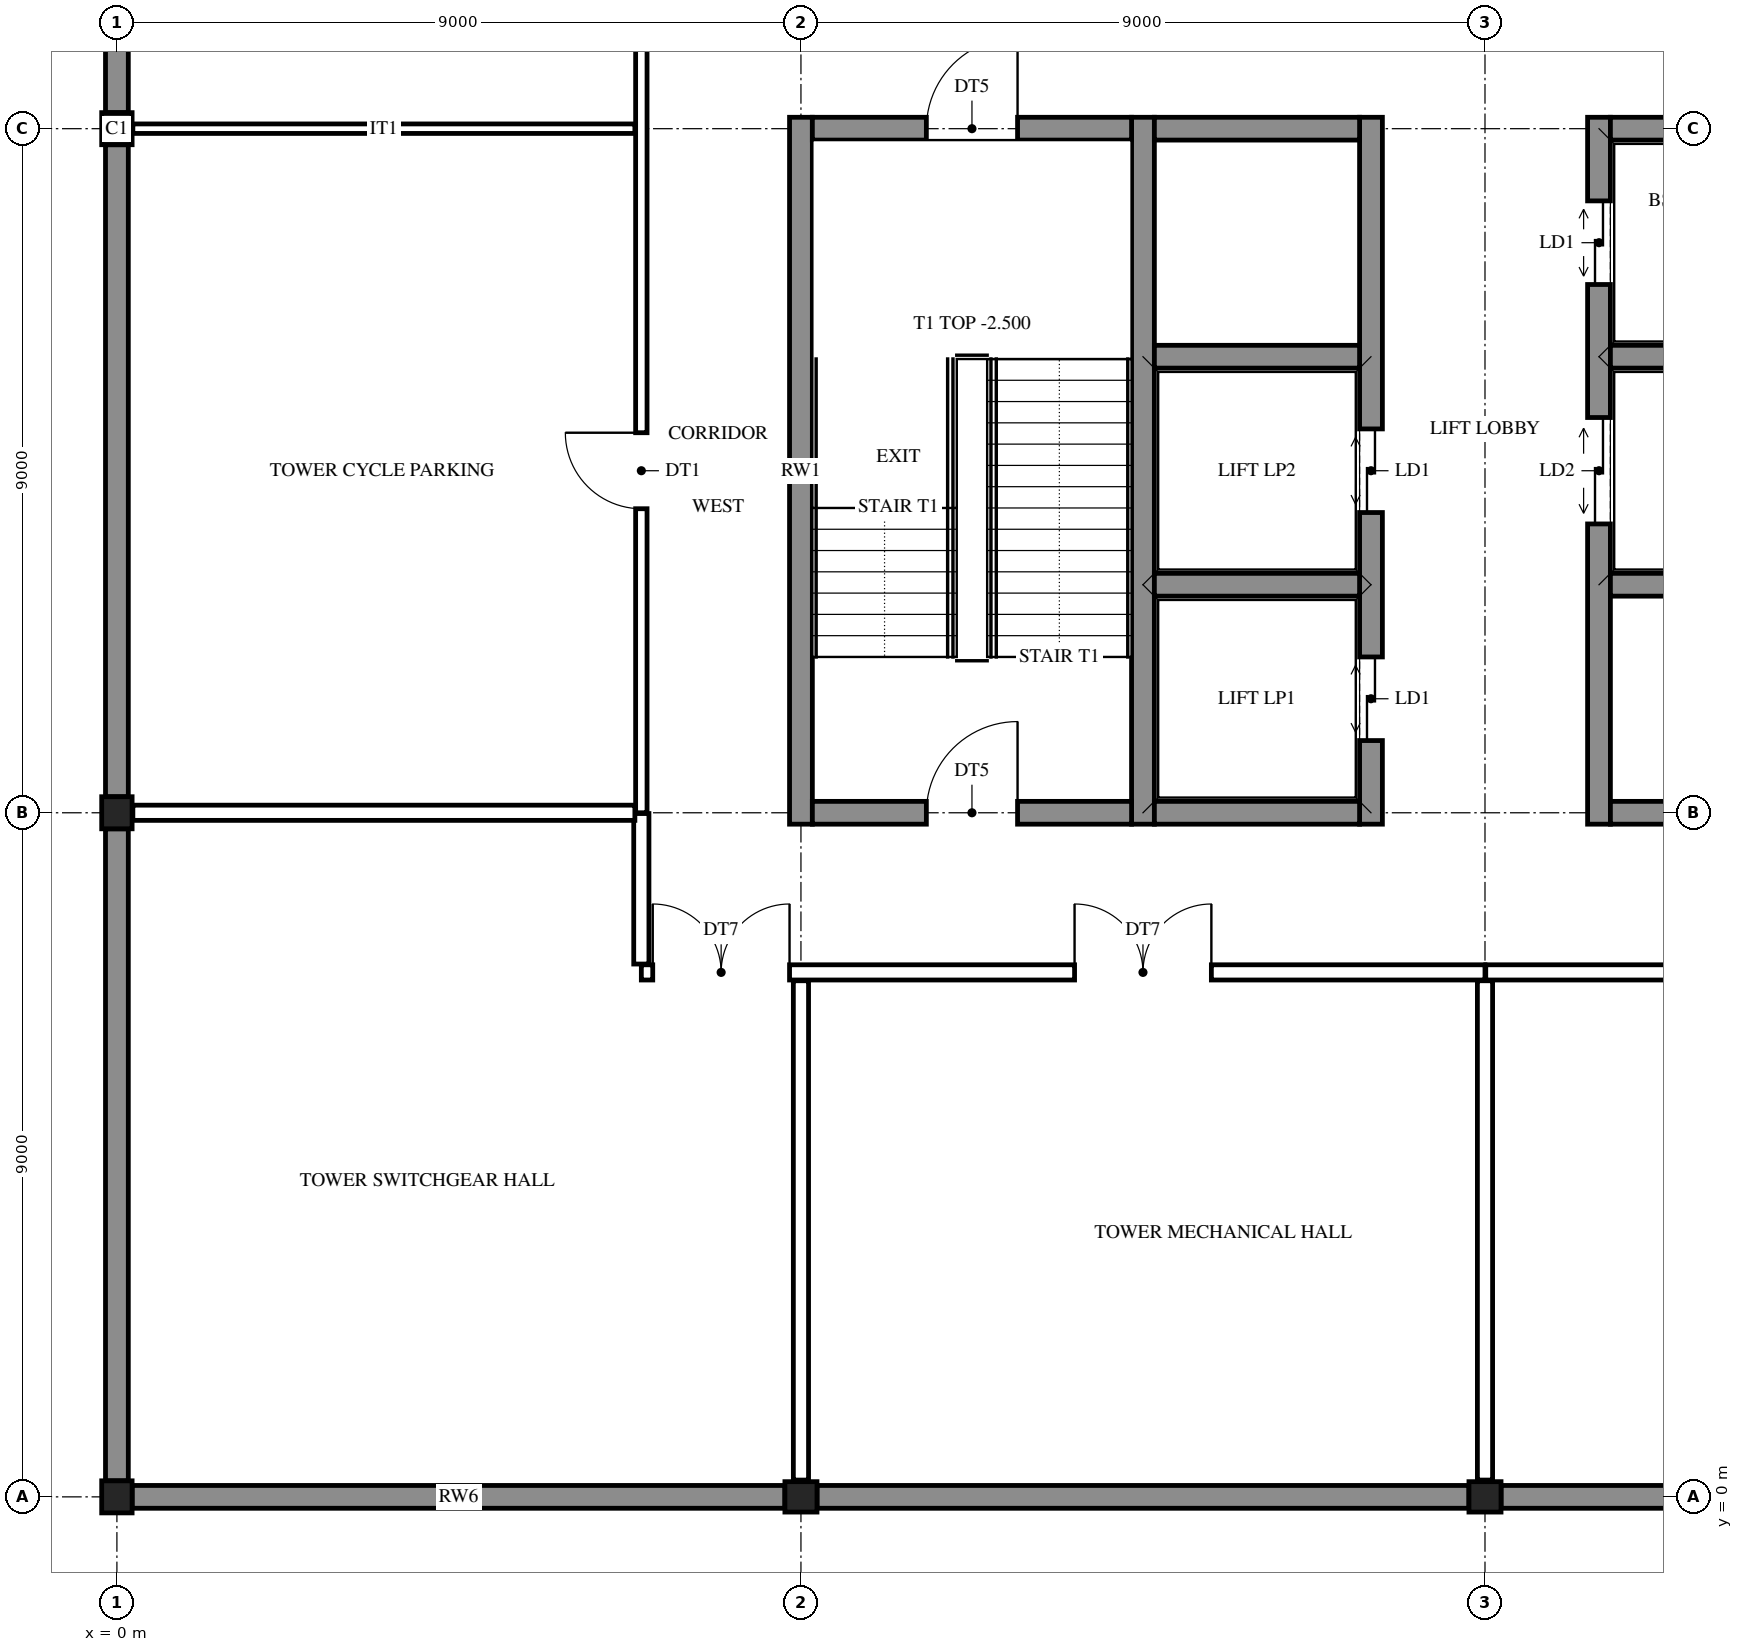
"""IFC4 building model, lengths in metres.
Left out: names, types, materials, properties, quantities, classifications, styles, units other than length and angle.
Written with IfcOpenShell. Run it as: python <this file> out.ifc"""

import sys

from ifc_helpers import new_model, si_unit, direction, frame, frame_2d, origin, origin_2d, place, context, subcontext, project, spatial, rectangle, i_section, extrude, element, fill, save


model = new_model("IFC4")
c1 = context("Model", 3, precision=1e-05, world=origin(), true_north=direction((0.0, 1.0)))
c2 = subcontext(c1, "Body", "Model", "MODEL_VIEW")
j1 = project(units=[si_unit("LENGTHUNIT", "METRE"), si_unit("PLANEANGLEUNIT", "RADIAN")], contexts=[c1])
p1 = place(None, origin())
s1 = spatial("IfcSite", under=j1, at=p1, CompositionType="ELEMENT")
p2 = place(p1, origin())
s2 = spatial("IfcBuilding", under=s1, at=p2, CompositionType="ELEMENT")
p3 = place(p2, frame((0.0, 0.0, -5.0)))
s3 = spatial("IfcBuildingStorey", under=s2, at=p3, CompositionType="ELEMENT", Elevation=-5.0)
for number, where, z_axis, x_axis in (
    (1, (0.0, 0.0, -0.4), (0.0, 0.0, 1.0), (1.0, 0.0, 0.0)),
    (2, (0.0, 9.0, -0.4), (0.0, 0.0, 1.0), (1.0, 0.0, 0.0)),
    (3, (0.0, 18.0, -0.4), (0.0, 0.0, 1.0), (1.0, 0.0, 0.0)),
    (4, (9.0, 0.0, -0.4), (0.0, 0.0, 1.0), (0.0, 1.0, 0.0)),
    (5, (18.0, 0.0, -0.4), (0.0, 0.0, 1.0), (0.0, 1.0, 0.0)),
):
    element("IfcColumn", number, at=place(p3, frame(where, z_axis=z_axis, x_axis=x_axis)), inside=s3, PredefinedType="COLUMN", context=c2, shape_type="SweptSolid", body=[
        extrude(i_section(OverallWidth=0.4, OverallDepth=0.422, WebThickness=0.028, FlangeThickness=0.036, at=origin_2d()), origin(), (0.0, 0.0, 1.0), 5.4),
    ])
for number, where, z_axis, x_axis in (
    (6, (9.0, 8.85, -0.4), (0.0, 0.0, 1.0), (0.0, 1.0, 0.0)),
    (7, (13.5, 8.85, -0.4), (0.0, 0.0, 1.0), (0.0, 1.0, 0.0)),
):
    element("IfcWall", number, at=place(p3, frame(where, z_axis=z_axis, x_axis=x_axis)), inside=s3, PredefinedType="SHEAR", context=c2, shape_type="SweptSolid", body=[
        extrude(rectangle(XDim=9.3, YDim=0.3, at=frame_2d((4.65, 0.0))), origin(), (0.0, 0.0, 1.0), 5.4),
    ])
p4 = place(p3, frame((16.5, 8.85, -0.4), z_axis=(0.0, 0.0, 1.0), x_axis=(0.0, 1.0, 0.0)))
e8 = element("IfcWall", 8, at=p4, inside=s3, PredefinedType="SHEAR", context=c2, shape_type="SweptSolid", body=[
    extrude(rectangle(XDim=9.3, YDim=0.3, at=frame_2d((4.65, 0.0))), origin(), (0.0, 0.0, 1.0), 5.4),
])
p5 = place(p4, frame((1.1, 0.0, 0.4)))
e9 = element("IfcOpeningElement", 9, at=p5, cuts=e8, PredefinedType="OPENING", context=c2, shape_type="SweptSolid", body=[
    extrude(rectangle(XDim=1.1, YDim=2.1, at=frame_2d((0.55, 1.05))), frame((0.0, 0.16, 0.0), z_axis=(0.0, -1.0, 0.0), x_axis=(1.0, 0.0, 0.0)), (0.0, 0.0, 1.0), 0.32),
])
p6 = place(p4, frame((4.1, 0.0, 0.4)))
e10 = element("IfcOpeningElement", 10, at=p6, cuts=e8, PredefinedType="OPENING", context=c2, shape_type="SweptSolid", body=[
    extrude(rectangle(XDim=1.1, YDim=2.1, at=frame_2d((0.55, 1.05))), frame((0.0, 0.16, 0.0), z_axis=(0.0, -1.0, 0.0), x_axis=(1.0, 0.0, 0.0)), (0.0, 0.0, 1.0), 0.32),
])
p7 = place(p3, frame((19.5, 8.85, -0.4), z_axis=(0.0, 0.0, 1.0), x_axis=(0.0, 1.0, 0.0)))
e11 = element("IfcWall", 11, at=p7, inside=s3, PredefinedType="SHEAR", context=c2, shape_type="SweptSolid", body=[
    extrude(rectangle(XDim=9.3, YDim=0.3, at=frame_2d((4.65, 0.0))), origin(), (0.0, 0.0, 1.0), 5.4),
])
p8 = place(p7, frame((3.95, 0.0, 0.4)))
e12 = element("IfcOpeningElement", 12, at=p8, cuts=e11, PredefinedType="OPENING", context=c2, shape_type="SweptSolid", body=[
    extrude(rectangle(XDim=1.4, YDim=2.1, at=frame_2d((0.7, 1.05))), frame((0.0, 0.16, 0.0), z_axis=(0.0, -1.0, 0.0), x_axis=(1.0, 0.0, 0.0)), (0.0, 0.0, 1.0), 0.32),
])
p9 = place(p7, frame((7.1, 0.0, 0.4)))
e13 = element("IfcOpeningElement", 13, at=p9, cuts=e11, PredefinedType="OPENING", context=c2, shape_type="SweptSolid", body=[
    extrude(rectangle(XDim=1.1, YDim=2.1, at=frame_2d((0.55, 1.05))), frame((0.0, 0.16, 0.0), z_axis=(0.0, -1.0, 0.0), x_axis=(1.0, 0.0, 0.0)), (0.0, 0.0, 1.0), 0.32),
])
p10 = place(p3, frame((9.15, 9.0, -0.4), z_axis=(0.0, 0.0, 1.0), x_axis=(1.0, 0.0, 0.0)))
e14 = element("IfcWall", 14, at=p10, inside=s3, PredefinedType="SHEAR", context=c2, shape_type="SweptSolid", body=[
    extrude(rectangle(XDim=4.2, YDim=0.3, at=frame_2d((2.1, 0.0))), origin(), (0.0, 0.0, 1.0), 5.4),
])
p11 = place(p10, frame((1.5, 0.0, 0.4)))
e15 = element("IfcOpeningElement", 15, at=p11, cuts=e14, PredefinedType="OPENING", context=c2, shape_type="SweptSolid", body=[
    extrude(rectangle(XDim=1.2, YDim=2.1, at=frame_2d((0.6, 1.05))), frame((0.0, 0.16, 0.0), z_axis=(0.0, -1.0, 0.0), x_axis=(1.0, 0.0, 0.0)), (0.0, 0.0, 1.0), 0.32),
])
for number, where, z_axis, x_axis in (
    (16, (13.65, 9.0, -0.4), (0.0, 0.0, 1.0), (1.0, 0.0, 0.0)),
    (17, (19.65, 9.0, -0.4), (0.0, 0.0, 1.0), (1.0, 0.0, 0.0)),
    (18, (13.65, 12.0, -0.4), (0.0, 0.0, 1.0), (1.0, 0.0, 0.0)),
    (19, (19.65, 12.0, -0.4), (0.0, 0.0, 1.0), (1.0, 0.0, 0.0)),
    (20, (13.65, 15.0, -0.4), (0.0, 0.0, 1.0), (1.0, 0.0, 0.0)),
    (21, (19.65, 15.0, -0.4), (0.0, 0.0, 1.0), (1.0, 0.0, 0.0)),
):
    element("IfcWall", number, at=place(p3, frame(where, z_axis=z_axis, x_axis=x_axis)), inside=s3, PredefinedType="SHEAR", context=c2, shape_type="SweptSolid", body=[
        extrude(rectangle(XDim=2.7, YDim=0.3, at=frame_2d((1.35, 0.0))), origin(), (0.0, 0.0, 1.0), 5.4),
    ])
p12 = place(p3, frame((9.15, 18.0, -0.4), z_axis=(0.0, 0.0, 1.0), x_axis=(1.0, 0.0, 0.0)))
e22 = element("IfcWall", 22, at=p12, inside=s3, PredefinedType="SHEAR", context=c2, shape_type="SweptSolid", body=[
    extrude(rectangle(XDim=4.2, YDim=0.3, at=frame_2d((2.1, 0.0))), origin(), (0.0, 0.0, 1.0), 5.4),
])
p13 = place(p12, frame((1.5, 0.0, 0.4)))
e23 = element("IfcOpeningElement", 23, at=p13, cuts=e22, PredefinedType="OPENING", context=c2, shape_type="SweptSolid", body=[
    extrude(rectangle(XDim=1.2, YDim=2.1, at=frame_2d((0.6, 1.05))), frame((0.0, 0.16, 0.0), z_axis=(0.0, -1.0, 0.0), x_axis=(1.0, 0.0, 0.0)), (0.0, 0.0, 1.0), 0.32),
])
for number, where, z_axis, x_axis in (
    (24, (13.65, 18.0, -0.4), (0.0, 0.0, 1.0), (1.0, 0.0, 0.0)),
    (25, (19.65, 18.0, -0.4), (0.0, 0.0, 1.0), (1.0, 0.0, 0.0)),
):
    element("IfcWall", number, at=place(p3, frame(where, z_axis=z_axis, x_axis=x_axis)), inside=s3, PredefinedType="SHEAR", context=c2, shape_type="SweptSolid", body=[
        extrude(rectangle(XDim=2.7, YDim=0.3, at=frame_2d((1.35, 0.0))), origin(), (0.0, 0.0, 1.0), 5.4),
    ])
for number, where, z_axis, x_axis in (
    (26, (26.789, 0.0, 0.0), (0.0, 0.0, 1.0), (-1.0, 0.0, 0.0)),
    (27, (17.789, 0.0, 0.0), (0.0, 0.0, 1.0), (-1.0, 0.0, 0.0)),
):
    element("IfcWall", number, at=place(p3, frame(where, z_axis=z_axis, x_axis=x_axis)), inside=s3, PredefinedType="SOLIDWALL", context=c2, shape_type="SweptSolid", body=[
        extrude(rectangle(XDim=8.578, YDim=0.3, at=frame_2d((4.289, 0.0))), origin(), (0.0, 0.0, 1.0), 5.0),
    ])
p14 = place(p3, frame((8.789, 0.0, 0.0), z_axis=(0.0, 0.0, 1.0), x_axis=(-1.0, 0.0, 0.0)))
e28 = element("IfcWall", 28, at=p14, inside=s3, PredefinedType="SOLIDWALL", context=c2, shape_type="SweptSolid", body=[
    extrude(rectangle(XDim=8.589, YDim=0.3, at=frame_2d((4.294, 0.0))), origin(), (0.0, 0.0, 1.0), 5.0),
])
for number, where, z_axis, x_axis in (
    (29, (0.0, 0.211, 0.0), (0.0, 0.0, 1.0), (0.0, 1.0, 0.0)),
    (30, (0.0, 9.211, 0.0), (0.0, 0.0, 1.0), (0.0, 1.0, 0.0)),
    (31, (0.0, 18.211, 0.0), (0.0, 0.0, 1.0), (0.0, 1.0, 0.0)),
):
    element("IfcWall", number, at=place(p3, frame(where, z_axis=z_axis, x_axis=x_axis)), inside=s3, PredefinedType="SOLIDWALL", context=c2, shape_type="SweptSolid", body=[
        extrude(rectangle(XDim=8.578, YDim=0.3, at=frame_2d((4.289, 0.0))), origin(), (0.0, 0.0, 1.0), 5.0),
    ])
p15 = place(p3, frame((6.9, 7.01, 0.0), z_axis=(0.0, 0.0, 1.0), x_axis=(0.0, 1.0, 0.0)))
e32 = element("IfcWall", 32, at=p15, inside=s3, PredefinedType="PARTITIONING", context=c2, shape_type="SweptSolid", body=[
    extrude(rectangle(XDim=1.98, YDim=0.2, at=frame_2d((0.99, 0.0))), origin(), (0.0, 0.0, 1.0), 4.267),
])
p16 = place(p3, frame((6.9, 9.0, 0.0), z_axis=(0.0, 0.0, 1.0), x_axis=(0.0, 1.0, 0.0)))
e33 = element("IfcWall", 33, at=p16, inside=s3, PredefinedType="PARTITIONING", context=c2, shape_type="SweptSolid", body=[
    extrude(rectangle(XDim=11.015, YDim=0.15, at=frame_2d((5.507, 0.0))), origin(), (0.0, 0.0, 1.0), 4.267),
])
p17 = place(p16, frame((4.0, 0.0, 0.0)))
e34 = element("IfcOpeningElement", 34, at=p17, cuts=e33, PredefinedType="OPENING", context=c2, shape_type="SweptSolid", body=[
    extrude(rectangle(XDim=1.0, YDim=2.1, at=frame_2d((0.5, 1.05))), frame((0.0, 0.085, 0.0), z_axis=(0.0, -1.0, 0.0), x_axis=(1.0, 0.0, 0.0)), (0.0, 0.0, 1.0), 0.17),
])
for number, where, z_axis, x_axis in (
    (35, (9.0, 0.221, 0.0), (0.0, 0.0, 1.0), (0.0, 1.0, 0.0)),
    (36, (18.0, 0.221, 0.0), (0.0, 0.0, 1.0), (0.0, 1.0, 0.0)),
):
    element("IfcWall", number, at=place(p3, frame(where, z_axis=z_axis, x_axis=x_axis)), inside=s3, PredefinedType="PARTITIONING", context=c2, shape_type="SweptSolid", body=[
        extrude(rectangle(XDim=6.569, YDim=0.2, at=frame_2d((3.285, 0.0))), origin(), (0.0, 0.0, 1.0), 4.267),
    ])
p18 = place(p3, frame((6.9, 6.9, 0.0), z_axis=(0.0, 0.0, 1.0), x_axis=(1.0, 0.0, 0.0)))
e37 = element("IfcWall", 37, at=p18, inside=s3, PredefinedType="PARTITIONING", context=c2, shape_type="SweptSolid", body=[
    extrude(rectangle(XDim=11.1, YDim=0.2, at=frame_2d((5.55, 0.0))), origin(), (0.0, 0.0, 1.0), 4.267),
])
p19 = place(p18, frame((0.15, 0.0, 0.0)))
e38 = element("IfcOpeningElement", 38, at=p19, cuts=e37, PredefinedType="OPENING", context=c2, shape_type="SweptSolid", body=[
    extrude(rectangle(XDim=1.8, YDim=2.1, at=frame_2d((0.9, 1.05))), frame((0.0, 0.11, 0.0), z_axis=(0.0, -1.0, 0.0), x_axis=(1.0, 0.0, 0.0)), (0.0, 0.0, 1.0), 0.22),
])
p20 = place(p18, frame((5.7, 0.0, 0.0)))
e39 = element("IfcOpeningElement", 39, at=p20, cuts=e37, PredefinedType="OPENING", context=c2, shape_type="SweptSolid", body=[
    extrude(rectangle(XDim=1.8, YDim=2.1, at=frame_2d((0.9, 1.05))), frame((0.0, 0.11, 0.0), z_axis=(0.0, -1.0, 0.0), x_axis=(1.0, 0.0, 0.0)), (0.0, 0.0, 1.0), 0.22),
])
p21 = place(p3, frame((18.01, 6.9, 0.0), z_axis=(0.0, 0.0, 1.0), x_axis=(1.0, 0.0, 0.0)))
e40 = element("IfcWall", 40, at=p21, inside=s3, PredefinedType="PARTITIONING", context=c2, shape_type="SweptSolid", body=[
    extrude(rectangle(XDim=8.99, YDim=0.2, at=frame_2d((4.495, 0.0))), origin(), (0.0, 0.0, 1.0), 4.267),
])
p22 = place(p21, frame((5.19, 0.0, 0.0)))
e41 = element("IfcOpeningElement", 41, at=p22, cuts=e40, PredefinedType="OPENING", context=c2, shape_type="SweptSolid", body=[
    extrude(rectangle(XDim=1.0, YDim=2.1, at=frame_2d((0.5, 1.05))), frame((0.0, 0.11, 0.0), z_axis=(0.0, -1.0, 0.0), x_axis=(1.0, 0.0, 0.0)), (0.0, 0.0, 1.0), 0.22),
])
p23 = place(p3, frame((0.21, 9.0, 0.0), z_axis=(0.0, 0.0, 1.0), x_axis=(1.0, 0.0, 0.0)))
e42 = element("IfcWall", 42, at=p23, inside=s3, PredefinedType="PARTITIONING", context=c2, shape_type="SweptSolid", body=[
    extrude(rectangle(XDim=6.605, YDim=0.2, at=frame_2d((3.302, 0.0))), origin(), (0.0, 0.0, 1.0), 4.267),
])
p24 = place(p3, frame((0.21, 18.0, 0.0), z_axis=(0.0, 0.0, 1.0), x_axis=(1.0, 0.0, 0.0)))
e43 = element("IfcWall", 43, at=p24, inside=s3, PredefinedType="PARTITIONING", context=c2, shape_type="SweptSolid", body=[
    extrude(rectangle(XDim=6.605, YDim=0.125, at=frame_2d((3.302, 0.0))), origin(), (0.0, 0.0, 1.0), 4.267),
])
p25 = place(p11, origin())
e44 = element("IfcDoor", 44, at=p25, inside=s3, OperationType="SINGLE_SWING_RIGHT", PredefinedType="DOOR", context=c2, shape_type="SweptSolid", body=[
    extrude(rectangle(XDim=1.2, YDim=2.1, at=frame_2d((0.6, 1.05))), frame((0.0, 0.025, 0.0), z_axis=(0.0, -1.0, 0.0), x_axis=(1.0, 0.0, 0.0)), (0.0, 0.0, 1.0), 0.05),
])
fill(e15, e44)
p26 = place(p19, frame((1.8, 0.0, 0.0), z_axis=(0.0, 0.0, 1.0), x_axis=(-1.0, 0.0, 0.0)))
e45 = element("IfcDoor", 45, at=p26, inside=s3, OperationType="DOUBLE_DOOR_SINGLE_SWING", PredefinedType="DOOR", context=c2, shape_type="SweptSolid", body=[
    extrude(rectangle(XDim=1.8, YDim=2.1, at=frame_2d((0.9, 1.05))), frame((0.0, 0.025, 0.0), z_axis=(0.0, -1.0, 0.0), x_axis=(1.0, 0.0, 0.0)), (0.0, 0.0, 1.0), 0.05),
])
fill(e38, e45)
p27 = place(p20, frame((1.8, 0.0, 0.0), z_axis=(0.0, 0.0, 1.0), x_axis=(-1.0, 0.0, 0.0)))
e46 = element("IfcDoor", 46, at=p27, inside=s3, OperationType="DOUBLE_DOOR_SINGLE_SWING", PredefinedType="DOOR", context=c2, shape_type="SweptSolid", body=[
    extrude(rectangle(XDim=1.8, YDim=2.1, at=frame_2d((0.9, 1.05))), frame((0.0, 0.025, 0.0), z_axis=(0.0, -1.0, 0.0), x_axis=(1.0, 0.0, 0.0)), (0.0, 0.0, 1.0), 0.05),
])
fill(e39, e46)
p28 = place(p17, origin())
e47 = element("IfcDoor", 47, at=p28, inside=s3, OperationType="SINGLE_SWING_RIGHT", PredefinedType="DOOR", context=c2, shape_type="SweptSolid", body=[
    extrude(rectangle(XDim=1.0, YDim=2.1, at=frame_2d((0.5, 1.05))), frame((0.0, 0.025, 0.0), z_axis=(0.0, -1.0, 0.0), x_axis=(1.0, 0.0, 0.0)), (0.0, 0.0, 1.0), 0.05),
])
fill(e34, e47)
p29 = place(p13, frame((1.2, 0.0, 0.0), z_axis=(0.0, 0.0, 1.0), x_axis=(-1.0, 0.0, 0.0)))
e48 = element("IfcDoor", 48, at=p29, inside=s3, OperationType="SINGLE_SWING_RIGHT", PredefinedType="DOOR", context=c2, shape_type="SweptSolid", body=[
    extrude(rectangle(XDim=1.2, YDim=2.1, at=frame_2d((0.6, 1.05))), frame((0.0, 0.025, 0.0), z_axis=(0.0, -1.0, 0.0), x_axis=(1.0, 0.0, 0.0)), (0.0, 0.0, 1.0), 0.05),
])
fill(e23, e48)
p30 = place(p5, origin())
e49 = element("IfcDoor", 49, at=p30, inside=s3, OperationType="DOUBLE_DOOR_SLIDING", PredefinedType="DOOR", context=c2, shape_type="SweptSolid", body=[
    extrude(rectangle(XDim=1.1, YDim=2.1, at=frame_2d((0.55, 1.05))), frame((0.0, 0.025, 0.0), z_axis=(0.0, -1.0, 0.0), x_axis=(1.0, 0.0, 0.0)), (0.0, 0.0, 1.0), 0.05),
])
fill(e9, e49)
p31 = place(p6, origin())
e50 = element("IfcDoor", 50, at=p31, inside=s3, OperationType="DOUBLE_DOOR_SLIDING", PredefinedType="DOOR", context=c2, shape_type="SweptSolid", body=[
    extrude(rectangle(XDim=1.1, YDim=2.1, at=frame_2d((0.55, 1.05))), frame((0.0, 0.025, 0.0), z_axis=(0.0, -1.0, 0.0), x_axis=(1.0, 0.0, 0.0)), (0.0, 0.0, 1.0), 0.05),
])
fill(e10, e50)
p32 = place(p8, origin())
e51 = element("IfcDoor", 51, at=p32, inside=s3, OperationType="DOUBLE_DOOR_SLIDING", PredefinedType="DOOR", context=c2, shape_type="SweptSolid", body=[
    extrude(rectangle(XDim=1.4, YDim=2.1, at=frame_2d((0.7, 1.05))), frame((0.0, 0.025, 0.0), z_axis=(0.0, -1.0, 0.0), x_axis=(1.0, 0.0, 0.0)), (0.0, 0.0, 1.0), 0.05),
])
fill(e12, e51)
p33 = place(p9, origin())
e52 = element("IfcDoor", 52, at=p33, inside=s3, OperationType="DOUBLE_DOOR_SLIDING", PredefinedType="DOOR", context=c2, shape_type="SweptSolid", body=[
    extrude(rectangle(XDim=1.1, YDim=2.1, at=frame_2d((0.55, 1.05))), frame((0.0, 0.025, 0.0), z_axis=(0.0, -1.0, 0.0), x_axis=(1.0, 0.0, 0.0)), (0.0, 0.0, 1.0), 0.05),
])
fill(e13, e52)
save(model, sys.argv[1])
